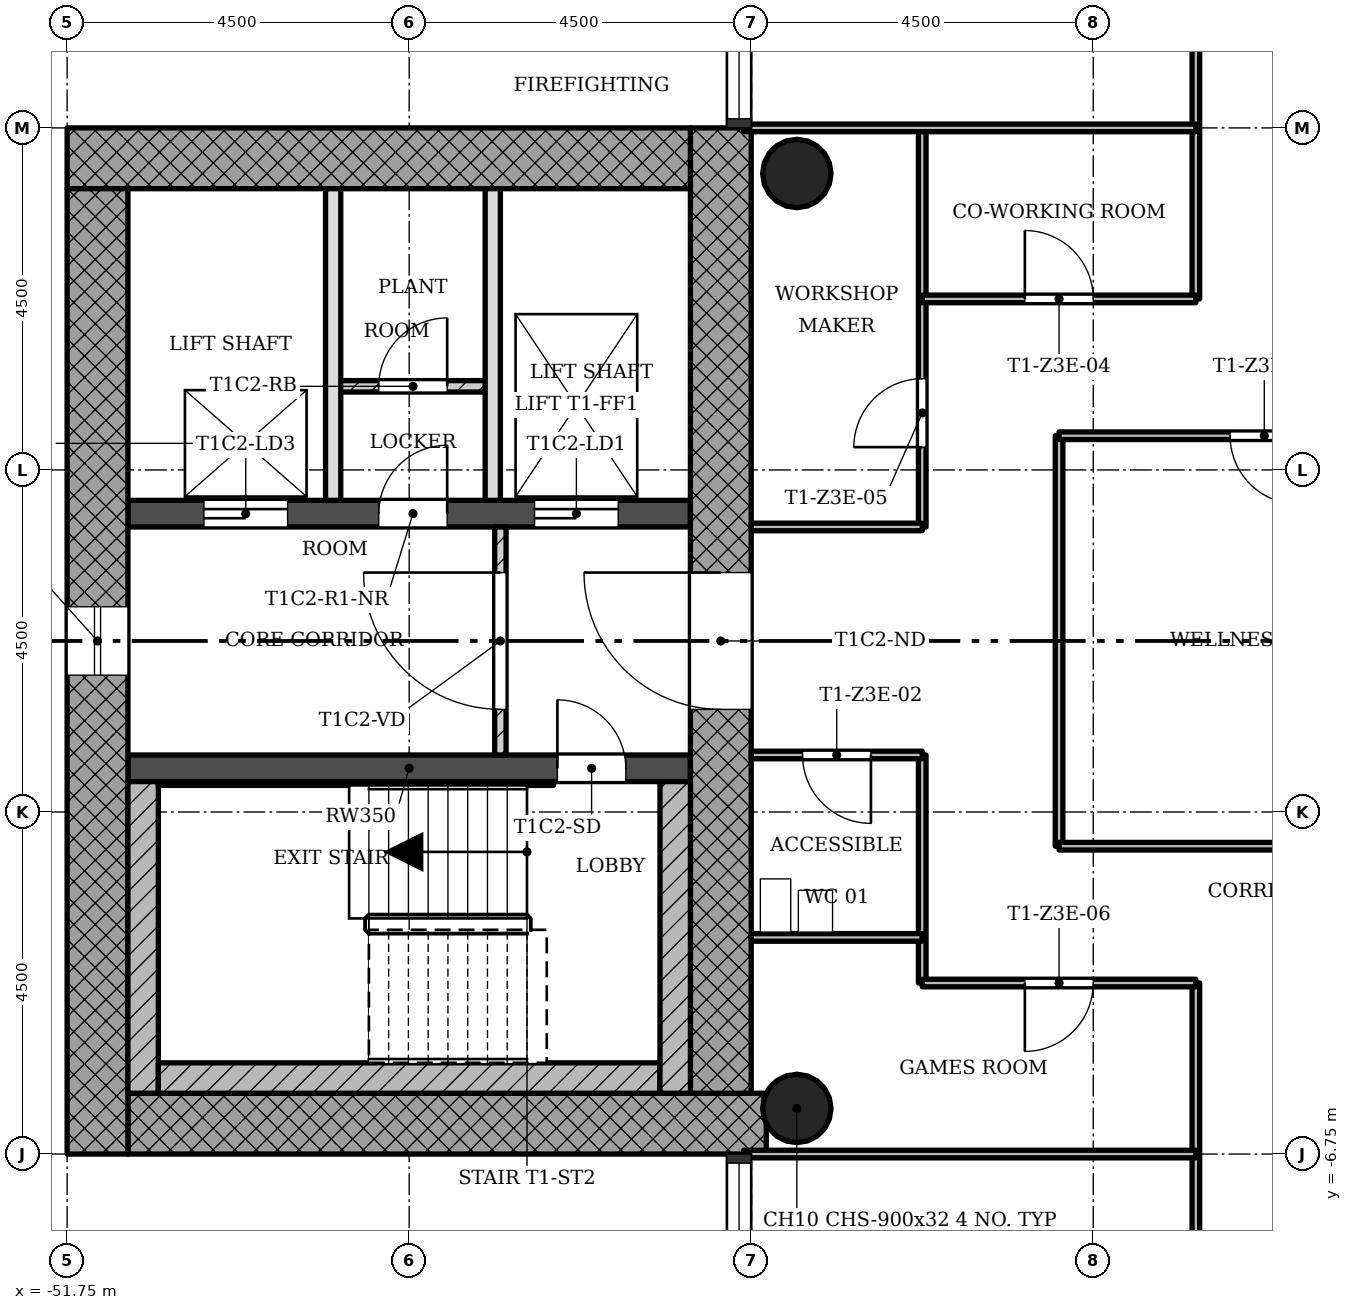
"""IFC4 building model, lengths in metres.
Left out: names, types, materials, properties, quantities, classifications, styles, units other than length and angle.
Written with IfcOpenShell. Run it as: python <this file> out.ifc"""

import sys

from ifc_helpers import new_model, si_unit, direction, frame, frame_2d, origin, origin_2d, place, context, subcontext, project, spatial, rectangle, hollow_circle, extrude, element, fill, save


model = new_model("IFC4")
c1 = context("Model", 3, precision=1e-05, world=origin(), true_north=direction((0.0, 1.0)))
c2 = subcontext(c1, "Body", "Model", "MODEL_VIEW")
j1 = project(units=[si_unit("LENGTHUNIT", "METRE"), si_unit("PLANEANGLEUNIT", "RADIAN")], contexts=[c1])
p1 = place(None, origin())
s1 = spatial("IfcSite", under=j1, at=p1, CompositionType="ELEMENT")
p2 = place(p1, origin())
s2 = spatial("IfcBuilding", under=s1, at=p2, CompositionType="ELEMENT")
p3 = place(p2, frame((0.0, 0.0, 177.9)))
s3 = spatial("IfcBuildingStorey", under=s2, at=p3, CompositionType="ELEMENT", Elevation=177.9)
p4 = place(p3, frame((-50.95, -6.35, 0.0), z_axis=(0.0, 0.0, 1.0), x_axis=(1.0, 0.0, 0.0)))
e1 = element("IfcWall", 1, at=p4, inside=s3, PredefinedType="SHEAR", context=c2, shape_type="SweptSolid", body=[
    extrude(rectangle(XDim=8.398, YDim=0.8, at=frame_2d((4.199, 0.0))), origin(), (0.0, 0.0, 1.0), 3.4),
])
p5 = place(p3, frame((-43.15, -5.95, 0.0), z_axis=(0.0, 0.0, 1.0), x_axis=(0.0, 1.0, 0.0)))
e2 = element("IfcWall", 2, at=p5, inside=s3, PredefinedType="SHEAR", context=c2, shape_type="SweptSolid", body=[
    extrude(rectangle(XDim=12.7, YDim=0.8, at=frame_2d((6.35, 0.0))), origin(), (0.0, 0.0, 1.0), 3.4),
])
p6 = place(p5, frame((5.05, 0.0, 0.0)))
e3 = element("IfcOpeningElement", 3, at=p6, cuts=e2, PredefinedType="OPENING", context=c2, shape_type="SweptSolid", body=[
    extrude(rectangle(XDim=1.8, YDim=2.1, at=frame_2d((0.9, 1.05))), frame((0.0, 0.41, 0.0), z_axis=(0.0, -1.0, 0.0), x_axis=(1.0, 0.0, 0.0)), (0.0, 0.0, 1.0), 0.82),
])
p7 = place(p3, frame((-43.55, 6.35, 0.0), z_axis=(0.0, 0.0, 1.0), x_axis=(-1.0, 0.0, 0.0)))
e4 = element("IfcWall", 4, at=p7, inside=s3, PredefinedType="SHEAR", context=c2, shape_type="SweptSolid", body=[
    extrude(rectangle(XDim=8.2, YDim=0.8, at=frame_2d((4.1, 0.0))), origin(), (0.0, 0.0, 1.0), 3.4),
])
p8 = place(p3, frame((-51.35, 5.95, 0.0), z_axis=(0.0, 0.0, 1.0), x_axis=(0.0, -1.0, 0.0)))
e5 = element("IfcWall", 5, at=p8, inside=s3, PredefinedType="SHEAR", context=c2, shape_type="SweptSolid", body=[
    extrude(rectangle(XDim=12.7, YDim=0.8, at=frame_2d((6.35, 0.0))), origin(), (0.0, 0.0, 1.0), 3.4),
])
p9 = place(p8, frame((5.5, 0.0, 0.45)))
e6 = element("IfcOpeningElement", 6, at=p9, cuts=e5, PredefinedType="OPENING", context=c2, shape_type="SweptSolid", body=[
    extrude(rectangle(XDim=0.9, YDim=2.4, at=frame_2d((0.45, 1.2))), frame((0.0, 0.41, 0.0), z_axis=(0.0, -1.0, 0.0), x_axis=(1.0, 0.0, 0.0)), (0.0, 0.0, 1.0), 0.82),
])
p10 = place(p3, frame((-50.95, -1.675, 0.0), z_axis=(0.0, 0.0, 1.0), x_axis=(1.0, 0.0, 0.0)))
e7 = element("IfcWall", 7, at=p10, inside=s3, PredefinedType="SHEAR", context=c2, shape_type="SweptSolid", body=[
    extrude(rectangle(XDim=7.4, YDim=0.35, at=frame_2d((3.7, 0.0))), origin(), (0.0, 0.0, 1.0), 3.4),
])
p11 = place(p10, frame((5.65, 0.0, 0.0)))
e8 = element("IfcOpeningElement", 8, at=p11, cuts=e7, PredefinedType="OPENING", context=c2, shape_type="SweptSolid", body=[
    extrude(rectangle(XDim=0.9, YDim=2.1, at=frame_2d((0.45, 1.05))), frame((0.0, 0.185, 0.0), z_axis=(0.0, -1.0, 0.0), x_axis=(1.0, 0.0, 0.0)), (0.0, 0.0, 1.0), 0.37),
])
p12 = place(p3, frame((-50.95, 1.675, 0.0), z_axis=(0.0, 0.0, 1.0), x_axis=(1.0, 0.0, 0.0)))
e9 = element("IfcWall", 9, at=p12, inside=s3, PredefinedType="SHEAR", context=c2, shape_type="SweptSolid", body=[
    extrude(rectangle(XDim=7.4, YDim=0.35, at=frame_2d((3.7, 0.0))), origin(), (0.0, 0.0, 1.0), 3.4),
])
p13 = place(p12, frame((5.35, 0.0, 0.0)))
e10 = element("IfcOpeningElement", 10, at=p13, cuts=e9, PredefinedType="OPENING", context=c2, shape_type="SweptSolid", body=[
    extrude(rectangle(XDim=1.1, YDim=2.1, at=frame_2d((0.55, 1.05))), frame((0.0, 0.185, 0.0), z_axis=(0.0, -1.0, 0.0), x_axis=(1.0, 0.0, 0.0)), (0.0, 0.0, 1.0), 0.37),
])
p14 = place(p12, frame((1.0, 0.0, 0.0)))
e11 = element("IfcOpeningElement", 11, at=p14, cuts=e9, PredefinedType="OPENING", context=c2, shape_type="SweptSolid", body=[
    extrude(rectangle(XDim=1.1, YDim=2.1, at=frame_2d((0.55, 1.05))), frame((0.0, 0.185, 0.0), z_axis=(0.0, -1.0, 0.0), x_axis=(1.0, 0.0, 0.0)), (0.0, 0.0, 1.0), 0.37),
])
p15 = place(p12, frame((3.3, 0.0, 0.0)))
e12 = element("IfcOpeningElement", 12, at=p15, cuts=e9, PredefinedType="OPENING", context=c2, shape_type="SweptSolid", body=[
    extrude(rectangle(XDim=0.9, YDim=2.1, at=frame_2d((0.45, 1.05))), frame((0.0, 0.185, 0.0), z_axis=(0.0, -1.0, 0.0), x_axis=(1.0, 0.0, 0.0)), (0.0, 0.0, 1.0), 0.37),
])
for number, where, z_axis, x_axis in (
    (13, (-42.15, -6.15, 0.0), (0.0, 0.0, 1.0), (1.0, 0.0, 0.0)),
    (14, (-42.15, 6.15, 0.0), (0.0, 0.0, 1.0), (1.0, 0.0, 0.0)),
):
    element("IfcColumn", number, at=place(p3, frame(where, z_axis=z_axis, x_axis=x_axis)), inside=s3, PredefinedType="COLUMN", context=c2, shape_type="SweptSolid", body=[
        extrude(hollow_circle(Radius=0.45, WallThickness=0.032, at=origin_2d()), origin(), (0.0, 0.0, 1.0), 3.4),
    ])
p16 = place(p3, frame((-46.05, 1.5, 0.0), z_axis=(0.0, 0.0, 1.0), x_axis=(0.0, -1.0, 0.0)))
e15 = element("IfcWall", 15, at=p16, inside=s3, PredefinedType="PARTITIONING", context=c2, shape_type="SweptSolid", body=[
    extrude(rectangle(XDim=3.0, YDim=0.15, at=frame_2d((1.5, 0.0))), origin(), (0.0, 0.0, 1.0), 3.0),
])
p17 = place(p16, frame((0.6, 0.0, 0.0)))
e16 = element("IfcOpeningElement", 16, at=p17, cuts=e15, PredefinedType="OPENING", context=c2, shape_type="SweptSolid", body=[
    extrude(rectangle(XDim=1.8, YDim=2.1, at=frame_2d((0.9, 1.05))), frame((0.0, 0.085, 0.0), z_axis=(0.0, -1.0, 0.0), x_axis=(1.0, 0.0, 0.0)), (0.0, 0.0, 1.0), 0.17),
])
for number, where, z_axis, x_axis in (
    (17, (-48.25, 5.95, 0.0), (0.0, 0.0, 1.0), (0.0, -1.0, 0.0)),
    (18, (-46.15, 5.95, 0.0), (0.0, 0.0, 1.0), (0.0, -1.0, 0.0)),
):
    element("IfcWall", number, at=place(p3, frame(where, z_axis=z_axis, x_axis=x_axis)), inside=s3, PredefinedType="SOLIDWALL", context=c2, shape_type="SweptSolid", body=[
        extrude(rectangle(XDim=4.1, YDim=0.2, at=frame_2d((2.05, 0.0))), origin(), (0.0, 0.0, 1.0), 3.0),
    ])
p18 = place(p3, frame((-46.15, 3.35, 0.0), z_axis=(0.0, 0.0, 1.0), x_axis=(-1.0, 0.0, 0.0)))
e19 = element("IfcWall", 19, at=p18, inside=s3, PredefinedType="PARTITIONING", context=c2, shape_type="SweptSolid", body=[
    extrude(rectangle(XDim=2.1, YDim=0.15, at=frame_2d((1.05, 0.0))), origin(), (0.0, 0.0, 1.0), 3.0),
])
p19 = place(p18, frame((0.6, 0.0, 0.0)))
e20 = element("IfcOpeningElement", 20, at=p19, cuts=e19, PredefinedType="OPENING", context=c2, shape_type="SweptSolid", body=[
    extrude(rectangle(XDim=0.9, YDim=2.1, at=frame_2d((0.45, 1.05))), frame((0.0, 0.085, 0.0), z_axis=(0.0, -1.0, 0.0), x_axis=(1.0, 0.0, 0.0)), (0.0, 0.0, 1.0), 0.17),
])
p20 = place(p3, frame((-40.5, -4.5, 0.0), z_axis=(0.0, 0.0, 1.0), x_axis=(0.0, 1.0, 0.0)))
e21 = element("IfcWall", 21, at=p20, inside=s3, PredefinedType="PARTITIONING", context=c2, shape_type="SweptSolid", body=[
    extrude(rectangle(XDim=3.0, YDim=0.1, at=frame_2d((1.5, 0.0))), origin(), (0.0, 0.0, 1.0), 3.0),
])
p21 = place(p3, frame((-40.5, 1.5, 0.0), z_axis=(0.0, 0.0, 1.0), x_axis=(0.0, 1.0, 0.0)))
e22 = element("IfcWall", 22, at=p21, inside=s3, PredefinedType="PARTITIONING", context=c2, shape_type="SweptSolid", body=[
    extrude(rectangle(XDim=5.25, YDim=0.1, at=frame_2d((2.625, 0.0))), origin(), (0.0, 0.0, 1.0), 3.0),
])
p22 = place(p21, frame((1.05, 0.0, 0.0)))
e23 = element("IfcOpeningElement", 23, at=p22, cuts=e22, PredefinedType="OPENING", context=c2, shape_type="SweptSolid", body=[
    extrude(rectangle(XDim=0.9, YDim=2.1, at=frame_2d((0.45, 1.05))), frame((0.0, 0.06, 0.0), z_axis=(0.0, -1.0, 0.0), x_axis=(1.0, 0.0, 0.0)), (0.0, 0.0, 1.0), 0.12),
])
p23 = place(p3, frame((-38.7, -2.7, 0.0), z_axis=(0.0, 0.0, 1.0), x_axis=(0.0, 1.0, 0.0)))
e24 = element("IfcWall", 24, at=p23, inside=s3, PredefinedType="PARTITIONING", context=c2, shape_type="SweptSolid", body=[
    extrude(rectangle(XDim=5.4, YDim=0.1, at=frame_2d((2.7, 0.0))), origin(), (0.0, 0.0, 1.0), 3.0),
])
p24 = place(p3, frame((-36.9, -8.55, 0.0), z_axis=(0.0, 0.0, 1.0), x_axis=(0.0, 1.0, 0.0)))
e25 = element("IfcWall", 25, at=p24, inside=s3, PredefinedType="PARTITIONING", context=c2, shape_type="SweptSolid", body=[
    extrude(rectangle(XDim=4.05, YDim=0.1, at=frame_2d((2.025, 0.0))), origin(), (0.0, 0.0, 1.0), 3.0),
])
p25 = place(p3, frame((-36.9, 4.5, 0.0), z_axis=(0.0, 0.0, 1.0), x_axis=(0.0, 1.0, 0.0)))
e26 = element("IfcWall", 26, at=p25, inside=s3, PredefinedType="PARTITIONING", context=c2, shape_type="SweptSolid", body=[
    extrude(rectangle(XDim=6.75, YDim=0.1, at=frame_2d((3.375, 0.0))), origin(), (0.0, 0.0, 1.0), 3.0),
])
p26 = place(p25, frame((4.05, 0.0, 0.0)))
e27 = element("IfcOpeningElement", 27, at=p26, cuts=e26, PredefinedType="OPENING", context=c2, shape_type="SweptSolid", body=[
    extrude(rectangle(XDim=0.9, YDim=2.1, at=frame_2d((0.45, 1.05))), frame((0.0, 0.06, 0.0), z_axis=(0.0, -1.0, 0.0), x_axis=(1.0, 0.0, 0.0)), (0.0, 0.0, 1.0), 0.12),
])
p27 = place(p3, frame((-42.85, -6.75, 0.0), z_axis=(0.0, 0.0, 1.0), x_axis=(1.0, 0.0, 0.0)))
e28 = element("IfcWall", 28, at=p27, inside=s3, PredefinedType="PARTITIONING", context=c2, shape_type="SweptSolid", body=[
    extrude(rectangle(XDim=5.95, YDim=0.1, at=frame_2d((2.975, 0.0))), origin(), (0.0, 0.0, 1.0), 3.0),
])
p28 = place(p3, frame((-40.5, -4.5, 0.0), z_axis=(0.0, 0.0, 1.0), x_axis=(1.0, 0.0, 0.0)))
e29 = element("IfcWall", 29, at=p28, inside=s3, PredefinedType="PARTITIONING", context=c2, shape_type="SweptSolid", body=[
    extrude(rectangle(XDim=3.6, YDim=0.1, at=frame_2d((1.8, 0.0))), origin(), (0.0, 0.0, 1.0), 3.0),
])
p29 = place(p28, frame((1.35, 0.0, 0.0)))
e30 = element("IfcOpeningElement", 30, at=p29, cuts=e29, PredefinedType="OPENING", context=c2, shape_type="SweptSolid", body=[
    extrude(rectangle(XDim=0.9, YDim=2.1, at=frame_2d((0.45, 1.05))), frame((0.0, 0.06, 0.0), z_axis=(0.0, -1.0, 0.0), x_axis=(1.0, 0.0, 0.0)), (0.0, 0.0, 1.0), 0.12),
])
p30 = place(p3, frame((-42.75, -3.9, 0.0), z_axis=(0.0, 0.0, 1.0), x_axis=(1.0, 0.0, 0.0)))
e31 = element("IfcWall", 31, at=p30, inside=s3, PredefinedType="PARTITIONING", context=c2, shape_type="SweptSolid", body=[
    extrude(rectangle(XDim=2.25, YDim=0.1, at=frame_2d((1.125, 0.0))), origin(), (0.0, 0.0, 1.0), 3.0),
])
p31 = place(p3, frame((-38.7, -2.7, 0.0), z_axis=(0.0, 0.0, 1.0), x_axis=(1.0, 0.0, 0.0)))
e32 = element("IfcWall", 32, at=p31, inside=s3, PredefinedType="PARTITIONING", context=c2, shape_type="SweptSolid", body=[
    extrude(rectangle(XDim=5.4, YDim=0.1, at=frame_2d((2.7, 0.0))), origin(), (0.0, 0.0, 1.0), 3.0),
])
p32 = place(p3, frame((-42.75, -1.5, 0.0), z_axis=(0.0, 0.0, 1.0), x_axis=(1.0, 0.0, 0.0)))
e33 = element("IfcWall", 33, at=p32, inside=s3, PredefinedType="PARTITIONING", context=c2, shape_type="SweptSolid", body=[
    extrude(rectangle(XDim=2.25, YDim=0.1, at=frame_2d((1.125, 0.0))), origin(), (0.0, 0.0, 1.0), 3.0),
])
p33 = place(p32, frame((0.675, 0.0, 0.0)))
e34 = element("IfcOpeningElement", 34, at=p33, cuts=e33, PredefinedType="OPENING", context=c2, shape_type="SweptSolid", body=[
    extrude(rectangle(XDim=0.9, YDim=2.1, at=frame_2d((0.45, 1.05))), frame((0.0, 0.06, 0.0), z_axis=(0.0, -1.0, 0.0), x_axis=(1.0, 0.0, 0.0)), (0.0, 0.0, 1.0), 0.12),
])
p34 = place(p3, frame((-42.75, 1.5, 0.0), z_axis=(0.0, 0.0, 1.0), x_axis=(1.0, 0.0, 0.0)))
e35 = element("IfcWall", 35, at=p34, inside=s3, PredefinedType="PARTITIONING", context=c2, shape_type="SweptSolid", body=[
    extrude(rectangle(XDim=2.25, YDim=0.1, at=frame_2d((1.125, 0.0))), origin(), (0.0, 0.0, 1.0), 3.0),
])
p35 = place(p3, frame((-38.7, 2.7, 0.0), z_axis=(0.0, 0.0, 1.0), x_axis=(1.0, 0.0, 0.0)))
e36 = element("IfcWall", 36, at=p35, inside=s3, PredefinedType="PARTITIONING", context=c2, shape_type="SweptSolid", body=[
    extrude(rectangle(XDim=5.4, YDim=0.1, at=frame_2d((2.7, 0.0))), origin(), (0.0, 0.0, 1.0), 3.0),
])
p36 = place(p35, frame((2.25, 0.0, 0.0)))
e37 = element("IfcOpeningElement", 37, at=p36, cuts=e36, PredefinedType="OPENING", context=c2, shape_type="SweptSolid", body=[
    extrude(rectangle(XDim=0.9, YDim=2.1, at=frame_2d((0.45, 1.05))), frame((0.0, 0.06, 0.0), z_axis=(0.0, -1.0, 0.0), x_axis=(1.0, 0.0, 0.0)), (0.0, 0.0, 1.0), 0.12),
])
p37 = place(p3, frame((-40.5, 4.5, 0.0), z_axis=(0.0, 0.0, 1.0), x_axis=(1.0, 0.0, 0.0)))
e38 = element("IfcWall", 38, at=p37, inside=s3, PredefinedType="PARTITIONING", context=c2, shape_type="SweptSolid", body=[
    extrude(rectangle(XDim=3.6, YDim=0.1, at=frame_2d((1.8, 0.0))), origin(), (0.0, 0.0, 1.0), 3.0),
])
p38 = place(p37, frame((1.35, 0.0, 0.0)))
e39 = element("IfcOpeningElement", 39, at=p38, cuts=e38, PredefinedType="OPENING", context=c2, shape_type="SweptSolid", body=[
    extrude(rectangle(XDim=0.9, YDim=2.1, at=frame_2d((0.45, 1.05))), frame((0.0, 0.06, 0.0), z_axis=(0.0, -1.0, 0.0), x_axis=(1.0, 0.0, 0.0)), (0.0, 0.0, 1.0), 0.12),
])
p39 = place(p3, frame((-42.85, 6.75, 0.0), z_axis=(0.0, 0.0, 1.0), x_axis=(1.0, 0.0, 0.0)))
e40 = element("IfcWall", 40, at=p39, inside=s3, PredefinedType="PARTITIONING", context=c2, shape_type="SweptSolid", body=[
    extrude(rectangle(XDim=5.95, YDim=0.1, at=frame_2d((2.975, 0.0))), origin(), (0.0, 0.0, 1.0), 3.0),
])
p40 = place(p3, frame((-50.75, -1.85, 0.0), z_axis=(0.0, 0.0, 1.0), x_axis=(0.0, -1.0, 0.0)))
e41 = element("IfcWall", 41, at=p40, inside=s3, PredefinedType="SHEAR", context=c2, shape_type="SweptSolid", body=[
    extrude(rectangle(XDim=4.1, YDim=0.4, at=frame_2d((2.05, 0.0))), origin(), (0.0, 0.0, 1.0), 3.4),
])
p41 = place(p3, frame((-43.95, -5.75, 0.0), z_axis=(0.0, 0.0, 1.0), x_axis=(-1.0, 0.0, 0.0)))
e42 = element("IfcWall", 42, at=p41, inside=s3, PredefinedType="SHEAR", context=c2, shape_type="SweptSolid", body=[
    extrude(rectangle(XDim=6.6, YDim=0.4, at=frame_2d((3.3, 0.0))), origin(), (0.0, 0.0, 1.0), 3.4),
])
p42 = place(p3, frame((-43.75, -1.85, 0.0), z_axis=(0.0, 0.0, 1.0), x_axis=(0.0, -1.0, 0.0)))
e43 = element("IfcWall", 43, at=p42, inside=s3, PredefinedType="SHEAR", context=c2, shape_type="SweptSolid", body=[
    extrude(rectangle(XDim=4.1, YDim=0.4, at=frame_2d((2.05, 0.0))), origin(), (0.0, 0.0, 1.0), 3.4),
])
p43 = place(p3, frame((-45.35, -1.875, 0.0), z_axis=(0.0, 0.0, 1.0), x_axis=(-1.0, 0.0, 0.0)))
e44 = element("IfcWall", 44, at=p43, inside=s3, PredefinedType="SHEAR", context=c2, shape_type="SweptSolid", body=[
    extrude(rectangle(XDim=5.2, YDim=0.05, at=frame_2d((2.6, 0.0))), origin(), (0.0, 0.0, 1.0), 3.4),
])
p44 = place(p9, origin())
e45 = element("IfcWindow", 45, at=p44, inside=s3, PartitioningType="SINGLE_PANEL", PredefinedType="WINDOW", context=c2, shape_type="SweptSolid", body=[
    extrude(rectangle(XDim=0.9, YDim=2.4, at=frame_2d((0.45, 1.2))), frame((0.0, 0.03, 0.0), z_axis=(0.0, -1.0, 0.0), x_axis=(1.0, 0.0, 0.0)), (0.0, 0.0, 1.0), 0.06),
])
fill(e6, e45)
p45 = place(p17, origin())
e46 = element("IfcDoor", 46, at=p45, inside=s3, OperationType="SINGLE_SWING_LEFT", PredefinedType="DOOR", context=c2, shape_type="SweptSolid", body=[
    extrude(rectangle(XDim=1.8, YDim=2.1, at=frame_2d((0.9, 1.05))), frame((0.0, 0.025, 0.0), z_axis=(0.0, -1.0, 0.0), x_axis=(1.0, 0.0, 0.0)), (0.0, 0.0, 1.0), 0.05),
])
fill(e16, e46)
p46 = place(p19, origin())
e47 = element("IfcDoor", 47, at=p46, inside=s3, OperationType="SINGLE_SWING_LEFT", PredefinedType="DOOR", context=c2, shape_type="SweptSolid", body=[
    extrude(rectangle(XDim=0.9, YDim=2.1, at=frame_2d((0.45, 1.05))), frame((0.0, 0.025, 0.0), z_axis=(0.0, -1.0, 0.0), x_axis=(1.0, 0.0, 0.0)), (0.0, 0.0, 1.0), 0.05),
])
fill(e20, e47)
p47 = place(p36, origin())
e48 = element("IfcDoor", 48, at=p47, inside=s3, OperationType="SINGLE_SWING_RIGHT", PredefinedType="DOOR", context=c2, shape_type="SweptSolid", body=[
    extrude(rectangle(XDim=0.9, YDim=2.1, at=frame_2d((0.45, 1.05))), frame((0.0, 0.025, 0.0), z_axis=(0.0, -1.0, 0.0), x_axis=(1.0, 0.0, 0.0)), (0.0, 0.0, 1.0), 0.05),
])
fill(e37, e48)
p48 = place(p33, origin())
e49 = element("IfcDoor", 49, at=p48, inside=s3, OperationType="SINGLE_SWING_RIGHT", PredefinedType="DOOR", context=c2, shape_type="SweptSolid", body=[
    extrude(rectangle(XDim=0.9, YDim=2.1, at=frame_2d((0.45, 1.05))), frame((0.0, 0.025, 0.0), z_axis=(0.0, -1.0, 0.0), x_axis=(1.0, 0.0, 0.0)), (0.0, 0.0, 1.0), 0.05),
])
fill(e34, e49)
p49 = place(p38, origin())
e50 = element("IfcDoor", 50, at=p49, inside=s3, OperationType="SINGLE_SWING_RIGHT", PredefinedType="DOOR", context=c2, shape_type="SweptSolid", body=[
    extrude(rectangle(XDim=0.9, YDim=2.1, at=frame_2d((0.45, 1.05))), frame((0.0, 0.025, 0.0), z_axis=(0.0, -1.0, 0.0), x_axis=(1.0, 0.0, 0.0)), (0.0, 0.0, 1.0), 0.05),
])
fill(e39, e50)
p50 = place(p22, origin())
e51 = element("IfcDoor", 51, at=p50, inside=s3, OperationType="SINGLE_SWING_RIGHT", PredefinedType="DOOR", context=c2, shape_type="SweptSolid", body=[
    extrude(rectangle(XDim=0.9, YDim=2.1, at=frame_2d((0.45, 1.05))), frame((0.0, 0.025, 0.0), z_axis=(0.0, -1.0, 0.0), x_axis=(1.0, 0.0, 0.0)), (0.0, 0.0, 1.0), 0.05),
])
fill(e23, e51)
p51 = place(p29, origin())
e52 = element("IfcDoor", 52, at=p51, inside=s3, OperationType="SINGLE_SWING_LEFT", PredefinedType="DOOR", context=c2, shape_type="SweptSolid", body=[
    extrude(rectangle(XDim=0.9, YDim=2.1, at=frame_2d((0.45, 1.05))), frame((0.0, 0.025, 0.0), z_axis=(0.0, -1.0, 0.0), x_axis=(1.0, 0.0, 0.0)), (0.0, 0.0, 1.0), 0.05),
])
fill(e30, e52)
p52 = place(p11, origin())
e53 = element("IfcDoor", 53, at=p52, inside=s3, OperationType="SINGLE_SWING_RIGHT", PredefinedType="DOOR", context=c2, shape_type="SweptSolid", body=[
    extrude(rectangle(XDim=0.9, YDim=2.1, at=frame_2d((0.45, 1.05))), frame((0.0, 0.025, 0.0), z_axis=(0.0, -1.0, 0.0), x_axis=(1.0, 0.0, 0.0)), (0.0, 0.0, 1.0), 0.05),
])
fill(e8, e53)
p53 = place(p13, origin())
e54 = element("IfcDoor", 54, at=p53, inside=s3, OperationType="SLIDING_TO_LEFT", PredefinedType="DOOR", context=c2, shape_type="SweptSolid", body=[
    extrude(rectangle(XDim=1.1, YDim=2.1, at=frame_2d((0.55, 1.05))), frame((0.0, 0.025, 0.0), z_axis=(0.0, -1.0, 0.0), x_axis=(1.0, 0.0, 0.0)), (0.0, 0.0, 1.0), 0.05),
])
fill(e10, e54)
p54 = place(p14, origin())
e55 = element("IfcDoor", 55, at=p54, inside=s3, OperationType="SLIDING_TO_LEFT", PredefinedType="DOOR", context=c2, shape_type="SweptSolid", body=[
    extrude(rectangle(XDim=1.1, YDim=2.1, at=frame_2d((0.55, 1.05))), frame((0.0, 0.025, 0.0), z_axis=(0.0, -1.0, 0.0), x_axis=(1.0, 0.0, 0.0)), (0.0, 0.0, 1.0), 0.05),
])
fill(e11, e55)
p55 = place(p15, origin())
e56 = element("IfcDoor", 56, at=p55, inside=s3, OperationType="SINGLE_SWING_LEFT", PredefinedType="DOOR", context=c2, shape_type="SweptSolid", body=[
    extrude(rectangle(XDim=0.9, YDim=2.1, at=frame_2d((0.45, 1.05))), frame((0.0, 0.025, 0.0), z_axis=(0.0, -1.0, 0.0), x_axis=(1.0, 0.0, 0.0)), (0.0, 0.0, 1.0), 0.05),
])
fill(e12, e56)
p56 = place(p6, origin())
e57 = element("IfcDoor", 57, at=p56, inside=s3, OperationType="SINGLE_SWING_LEFT", PredefinedType="DOOR", context=c2, shape_type="SweptSolid", body=[
    extrude(rectangle(XDim=1.8, YDim=2.1, at=frame_2d((0.9, 1.05))), frame((0.0, 0.025, 0.0), z_axis=(0.0, -1.0, 0.0), x_axis=(1.0, 0.0, 0.0)), (0.0, 0.0, 1.0), 0.05),
])
fill(e3, e57)
save(model, sys.argv[1])
